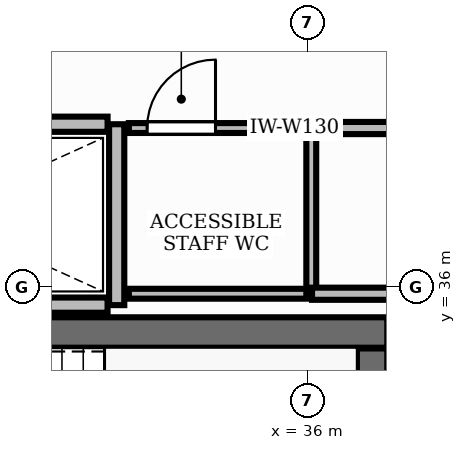
"""IFC4 building model, lengths in metres.
Left out: names, types, materials, properties, quantities, classifications, styles, units other than length and angle.
Written with IfcOpenShell. Run it as: python <this file> out.ifc"""

import sys

from ifc_helpers import new_model, si_unit, direction, frame, frame_2d, origin, place, context, subcontext, project, spatial, rectangle, extrude, element, fill, save


model = new_model("IFC4")
c1 = context("Model", 3, precision=1e-05, world=origin(), true_north=direction((0.0, 1.0)))
c2 = subcontext(c1, "Body", "Model", "MODEL_VIEW")
j1 = project(units=[si_unit("LENGTHUNIT", "METRE"), si_unit("PLANEANGLEUNIT", "RADIAN")], contexts=[c1])
p1 = place(None, origin())
s1 = spatial("IfcSite", under=j1, at=p1, CompositionType="ELEMENT")
p2 = place(p1, origin())
s2 = spatial("IfcBuilding", under=s1, at=p2, CompositionType="ELEMENT")
p3 = place(p2, frame((0.0, 0.0, 273.0)))
s3 = spatial("IfcBuildingStorey", under=s2, at=p3, CompositionType="ELEMENT", Elevation=273.0)
p4 = place(p3, frame((28.852, 35.4, 0.0), z_axis=(0.0, 0.0, 1.0), x_axis=(1.0, 0.0, 0.0)))
e1 = element("IfcWall", 1, at=p4, inside=s3, PredefinedType="SHEAR", context=c2, shape_type="SweptSolid", body=[
    extrude(rectangle(XDim=8.198, YDim=0.4, at=frame_2d((4.099, 0.0))), origin(), (0.0, 0.0, 1.0), 3.88),
])
p5 = place(p3, frame((36.85, 32.11, 0.0), z_axis=(0.0, 0.0, 1.0), x_axis=(0.0, 1.0, 0.0)))
e2 = element("IfcWall", 2, at=p5, inside=s3, PredefinedType="SHEAR", context=c2, shape_type="SweptSolid", body=[
    extrude(rectangle(XDim=3.08, YDim=0.4, at=frame_2d((1.54, 0.0))), origin(), (0.0, 0.0, 1.0), 3.88),
])
p6 = place(p3, frame((33.49, 35.76, 0.0), z_axis=(0.0, 0.0, 1.0), x_axis=(0.0, 1.0, 0.0)))
e3 = element("IfcWall", 3, at=p6, inside=s3, PredefinedType="PARTITIONING", context=c2, shape_type="SweptSolid", body=[
    extrude(rectangle(XDim=2.38, YDim=0.2, at=frame_2d((1.19, 0.0))), origin(), (0.0, 0.0, 1.0), 2.89),
])
for number, where, z_axis, x_axis in (
    (4, (28.8, 35.76, 0.0), (0.0, 0.0, 1.0), (1.0, 0.0, 0.0)),
    (5, (28.8, 38.14, 0.0), (0.0, 0.0, 1.0), (1.0, 0.0, 0.0)),
):
    element("IfcWall", number, at=place(p3, frame(where, z_axis=z_axis, x_axis=x_axis)), inside=s3, PredefinedType="PARTITIONING", context=c2, shape_type="SweptSolid", body=[
        extrude(rectangle(XDim=4.57, YDim=0.2, at=frame_2d((2.285, 0.0))), origin(), (0.0, 0.0, 1.0), 2.89),
    ])
p7 = place(p3, frame((33.65, 38.09, 0.0), z_axis=(0.0, 0.0, 1.0), x_axis=(1.0, 0.0, 0.0)))
e6 = element("IfcWall", 6, at=p7, inside=s3, PredefinedType="PARTITIONING", context=c2, shape_type="SweptSolid", body=[
    extrude(rectangle(XDim=2.4, YDim=0.13, at=frame_2d((1.2, 0.0))), origin(), (0.0, 0.0, 1.0), 2.89),
])
p8 = place(p7, frame((0.24, 0.0, 0.0)))
e7 = element("IfcOpeningElement", 7, at=p8, cuts=e6, PredefinedType="OPENING", context=c2, shape_type="SweptSolid", body=[
    extrude(rectangle(XDim=0.9, YDim=2.15, at=frame_2d((0.45, 1.075))), frame((0.0, 0.08, 0.0), z_axis=(0.0, -1.0, 0.0), x_axis=(1.0, 0.0, 0.0)), (0.0, 0.0, 1.0), 0.16),
])
p9 = place(p3, frame((36.05, 35.91, 0.0), z_axis=(0.0, 0.0, 1.0), x_axis=(-1.0, 0.0, 0.0)))
e8 = element("IfcWall", 8, at=p9, inside=s3, PredefinedType="PARTITIONING", context=c2, shape_type="SweptSolid", body=[
    extrude(rectangle(XDim=2.4, YDim=0.13, at=frame_2d((1.2, 0.0))), origin(), (0.0, 0.0, 1.0), 2.89),
])
p10 = place(p3, frame((36.05, 38.09, 0.0), z_axis=(0.0, 0.0, 1.0), x_axis=(0.0, -1.0, 0.0)))
e9 = element("IfcWall", 9, at=p10, inside=s3, PredefinedType="PARTITIONING", context=c2, shape_type="SweptSolid", body=[
    extrude(rectangle(XDim=2.18, YDim=0.13, at=frame_2d((1.09, 0.0))), origin(), (0.0, 0.0, 1.0), 2.89),
])
p11 = place(p3, frame((37.35, 35.91, 0.0), z_axis=(0.0, 0.0, 1.0), x_axis=(-1.0, 0.0, 0.0)))
e10 = element("IfcWall", 10, at=p11, inside=s3, PredefinedType="PARTITIONING", context=c2, shape_type="SweptSolid", body=[
    extrude(rectangle(XDim=1.29, YDim=0.16, at=frame_2d((0.645, 0.0))), origin(), (0.0, 0.0, 1.0), 2.89),
])
p12 = place(p3, frame((36.06, 38.09, 0.0), z_axis=(0.0, 0.0, 1.0), x_axis=(1.0, 0.0, 0.0)))
e11 = element("IfcWall", 11, at=p12, inside=s3, PredefinedType="PARTITIONING", context=c2, shape_type="SweptSolid", body=[
    extrude(rectangle(XDim=1.14, YDim=0.16, at=frame_2d((0.57, 0.0))), origin(), (0.0, 0.0, 1.0), 2.89),
])
p13 = place(p8, origin())
e12 = element("IfcDoor", 12, at=p13, inside=s3, OperationType="SINGLE_SWING_RIGHT", PredefinedType="DOOR", context=c2, shape_type="SweptSolid", body=[
    extrude(rectangle(XDim=0.9, YDim=2.15, at=frame_2d((0.45, 1.075))), frame((0.0, 0.025, 0.0), z_axis=(0.0, -1.0, 0.0), x_axis=(1.0, 0.0, 0.0)), (0.0, 0.0, 1.0), 0.05),
])
fill(e7, e12)
save(model, sys.argv[1])
